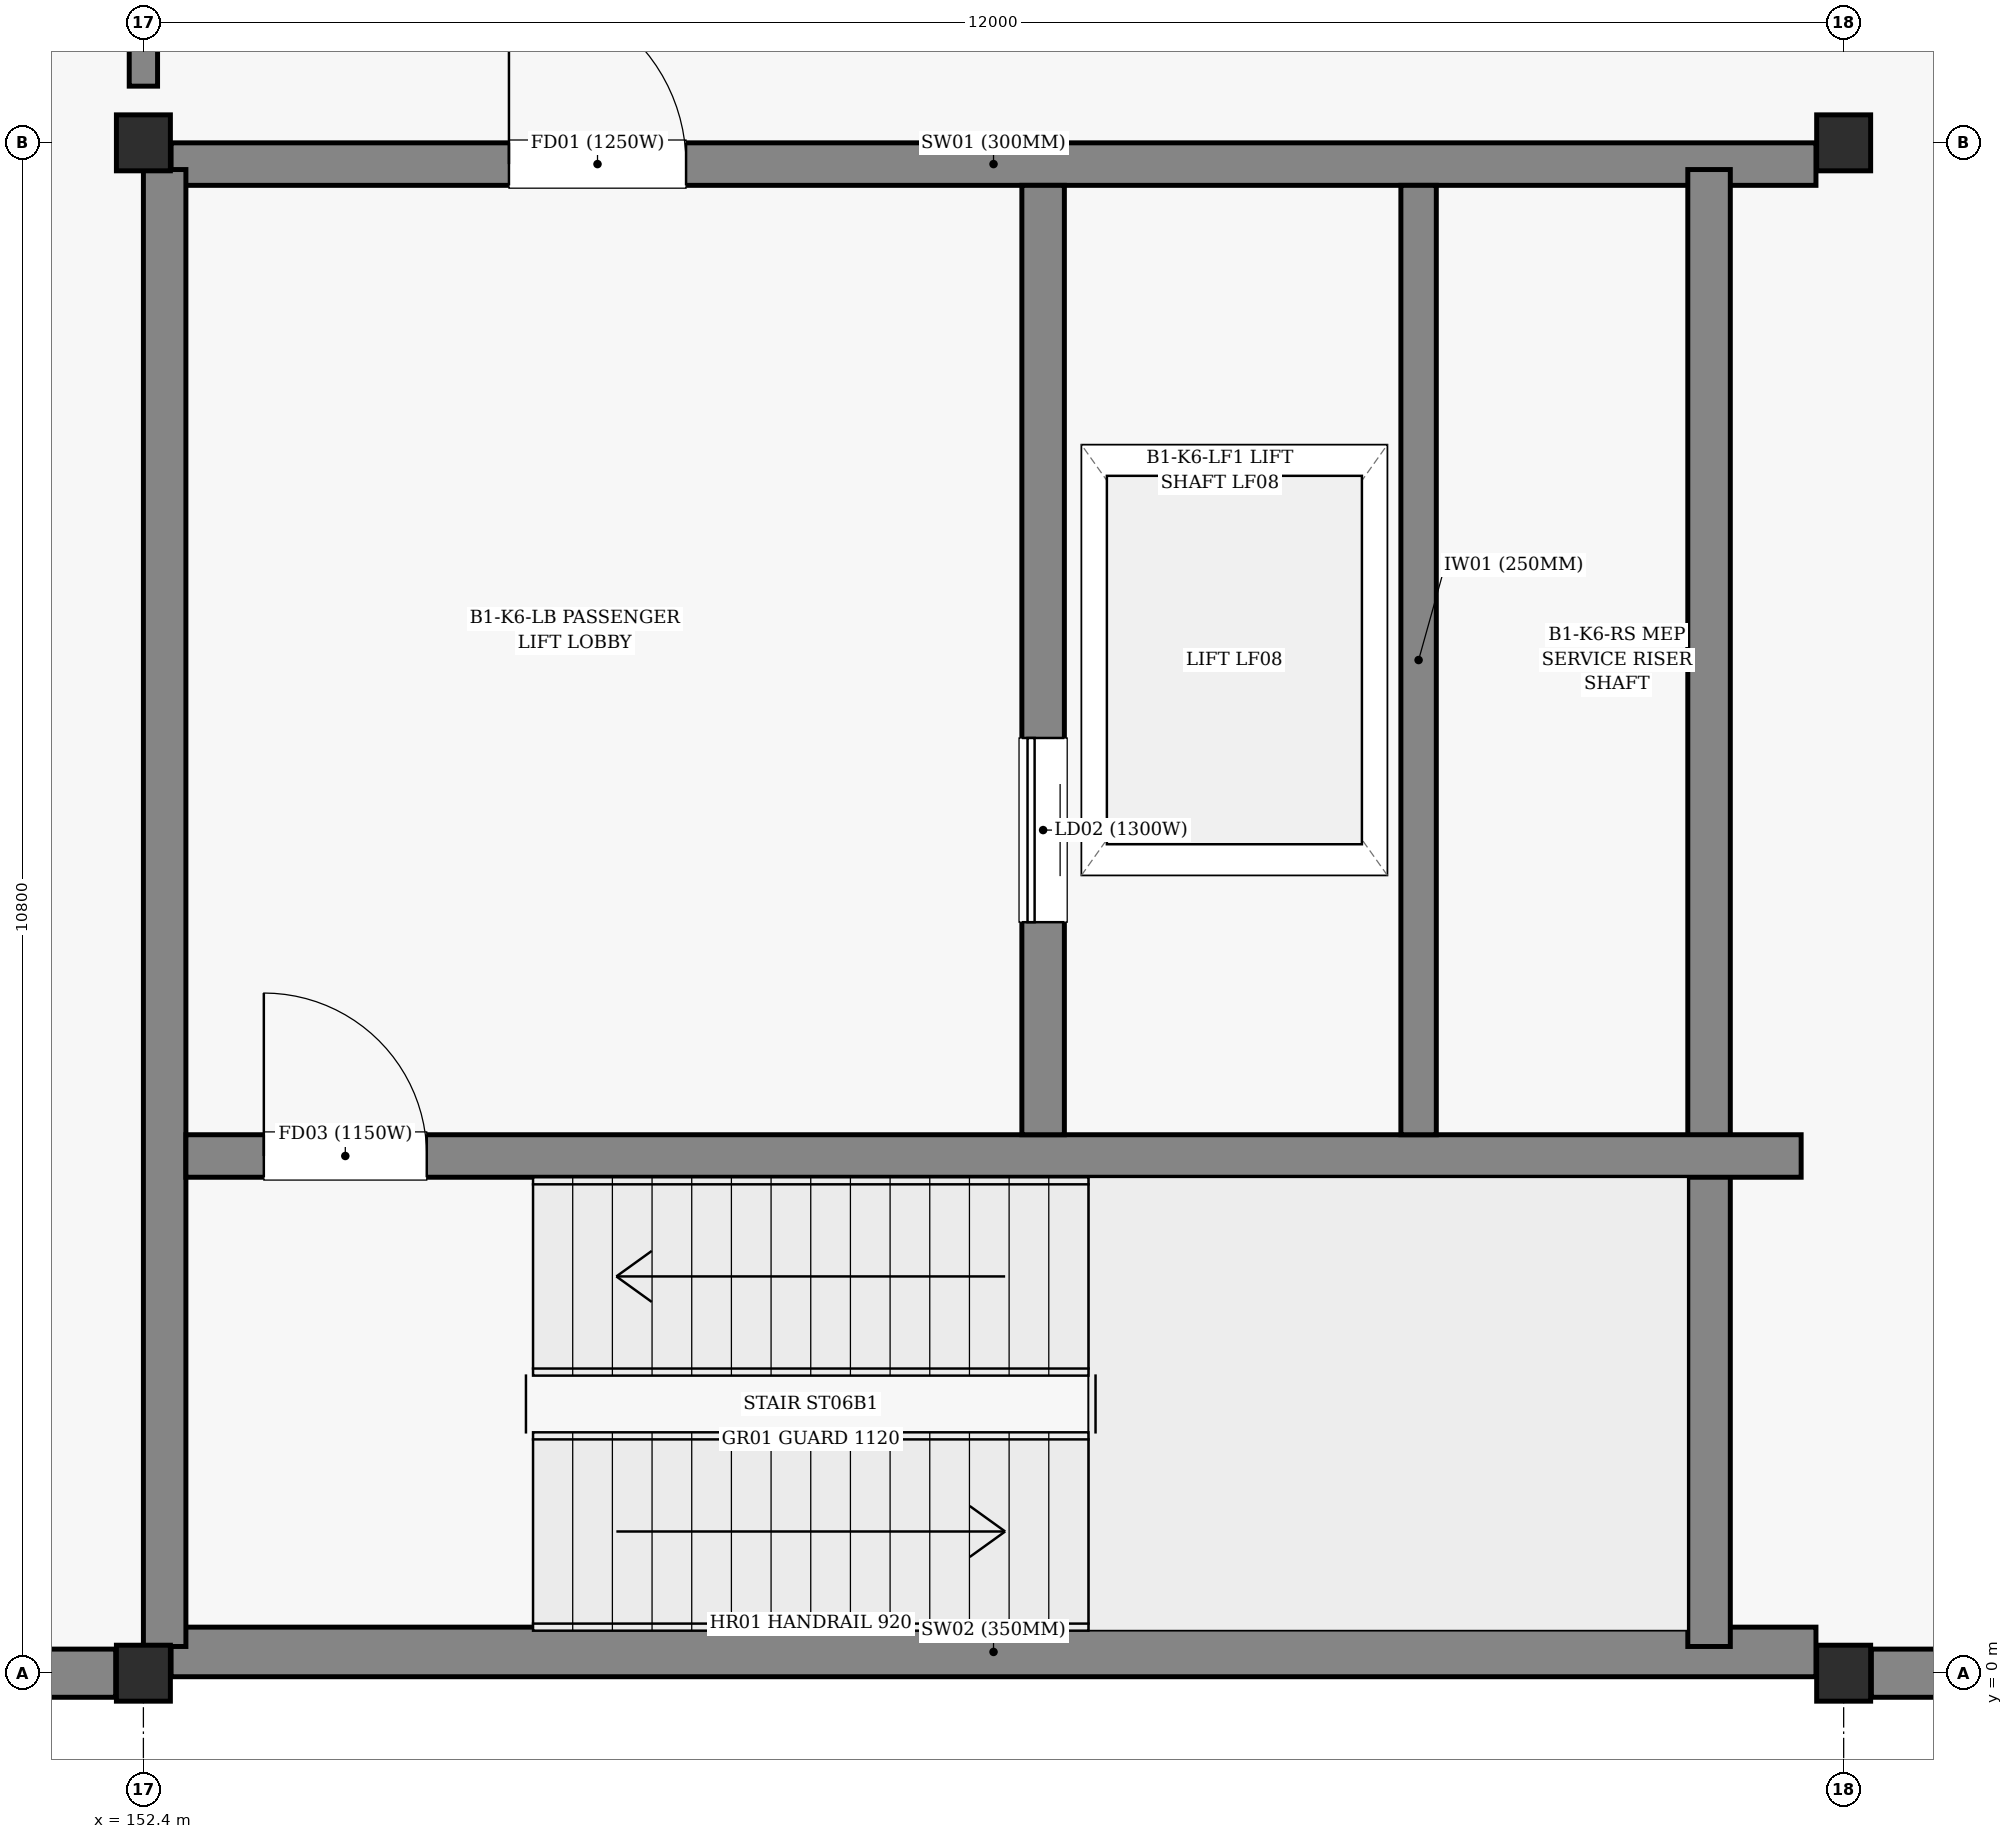
"""IFC4 building model, lengths in metres.
Left out: names, types, materials, properties, quantities, classifications, styles, units other than length and angle.
Written with IfcOpenShell. Run it as: python <this file> out.ifc"""

import sys

from ifc_helpers import new_model, si_unit, direction, frame, frame_2d, origin, origin_2d, place, context, subcontext, project, spatial, rectangle, i_section, extrude, element, fill, save


model = new_model("IFC4")
c1 = context("Model", 3, precision=1e-05, world=origin(), true_north=direction((0.0, 1.0)))
c2 = subcontext(c1, "Body", "Model", "MODEL_VIEW")
j1 = project(units=[si_unit("LENGTHUNIT", "METRE"), si_unit("PLANEANGLEUNIT", "RADIAN")], contexts=[c1])
p1 = place(None, origin())
s1 = spatial("IfcSite", under=j1, at=p1, CompositionType="ELEMENT")
p2 = place(p1, origin())
s2 = spatial("IfcBuilding", under=s1, at=p2, CompositionType="ELEMENT")
p3 = place(p2, frame((0.0, 0.0, -5.4)))
s3 = spatial("IfcBuildingStorey", under=s2, at=p3, CompositionType="ELEMENT", Elevation=-5.4)
for number, where, z_axis, x_axis in (
    (1, (152.4, 0.0, 0.0), (0.0, 0.0, 1.0), (1.0, 0.0, 0.0)),
    (2, (152.4, 10.8, 0.0), (0.0, 0.0, 1.0), (1.0, 0.0, 0.0)),
    (3, (164.4, 0.0, 0.0), (0.0, 0.0, 1.0), (1.0, 0.0, 0.0)),
    (4, (164.4, 10.8, 0.0), (0.0, 0.0, 1.0), (1.0, 0.0, 0.0)),
):
    element("IfcColumn", number, at=place(p3, frame(where, z_axis=z_axis, x_axis=x_axis)), inside=s3, PredefinedType="COLUMN", context=c2, shape_type="SweptSolid", body=[
        extrude(i_section(OverallWidth=0.395, OverallDepth=0.381, WebThickness=0.018, FlangeThickness=0.03, FilletRadius=0.015, at=origin_2d()), origin(), (0.0, 0.0, 1.0), 5.4),
    ])
for number, where, z_axis, x_axis in (
    (5, (140.595, 0.0, 0.0), (0.0, 0.0, 1.0), (1.0, 0.0, 0.0)),
    (6, (164.595, 0.0, 0.0), (0.0, 0.0, 1.0), (1.0, 0.0, 0.0)),
):
    element("IfcWall", number, at=place(p3, frame(where, z_axis=z_axis, x_axis=x_axis)), inside=s3, PredefinedType="USERDEFINED", context=c2, shape_type="SweptSolid", body=[
        extrude(rectangle(XDim=11.609, YDim=0.34, at=frame_2d((5.805, 0.0))), origin(), (0.0, 0.0, 1.0), 4.06),
    ])
p4 = place(p3, frame((152.595, 0.15, 0.0), z_axis=(0.0, 0.0, 1.0), x_axis=(1.0, 0.0, 0.0)))
e7 = element("IfcWall", 7, at=p4, inside=s3, PredefinedType="SHEAR", context=c2, shape_type="SweptSolid", body=[
    extrude(rectangle(XDim=11.609, YDim=0.35, at=frame_2d((5.805, 0.0))), origin(), (0.0, 0.0, 1.0), 5.12),
])
p5 = place(p3, frame((152.595, 10.65, 0.0), z_axis=(0.0, 0.0, 1.0), x_axis=(1.0, 0.0, 0.0)))
e8 = element("IfcWall", 8, at=p5, inside=s3, PredefinedType="SHEAR", context=c2, shape_type="SweptSolid", body=[
    extrude(rectangle(XDim=11.609, YDim=0.3, at=frame_2d((5.805, 0.0))), origin(), (0.0, 0.0, 1.0), 5.12),
])
p6 = place(p5, frame((2.385, 0.0, 0.0)))
e9 = element("IfcOpeningElement", 9, at=p6, cuts=e8, PredefinedType="OPENING", context=c2, shape_type="SweptSolid", body=[
    extrude(rectangle(XDim=1.25, YDim=2.15, at=frame_2d((0.625, 1.075))), frame((0.0, 0.16, 0.0), z_axis=(0.0, -1.0, 0.0), x_axis=(1.0, 0.0, 0.0)), (0.0, 0.0, 1.0), 0.32),
])
for number, where, z_axis, x_axis in (
    (10, (152.55, 0.188, 0.0), (0.0, 0.0, 1.0), (0.0, 1.0, 0.0)),
    (11, (163.45, 0.188, 0.0), (0.0, 0.0, 1.0), (0.0, 1.0, 0.0)),
):
    element("IfcWall", number, at=place(p3, frame(where, z_axis=z_axis, x_axis=x_axis)), inside=s3, PredefinedType="SHEAR", context=c2, shape_type="SweptSolid", body=[
        extrude(rectangle(XDim=10.423, YDim=0.3, at=frame_2d((5.211, 0.0))), origin(), (0.0, 0.0, 1.0), 5.12),
    ])
p7 = place(p3, frame((152.7, 3.65, 0.0), z_axis=(0.0, 0.0, 1.0), x_axis=(1.0, 0.0, 0.0)))
e12 = element("IfcWall", 12, at=p7, inside=s3, PredefinedType="SHEAR", context=c2, shape_type="SweptSolid", body=[
    extrude(rectangle(XDim=11.4, YDim=0.3, at=frame_2d((5.7, 0.0))), origin(), (0.0, 0.0, 1.0), 5.12),
])
p8 = place(p7, frame((0.55, 0.0, 0.0)))
e13 = element("IfcOpeningElement", 13, at=p8, cuts=e12, PredefinedType="OPENING", context=c2, shape_type="SweptSolid", body=[
    extrude(rectangle(XDim=1.15, YDim=2.15, at=frame_2d((0.575, 1.075))), frame((0.0, 0.16, 0.0), z_axis=(0.0, -1.0, 0.0), x_axis=(1.0, 0.0, 0.0)), (0.0, 0.0, 1.0), 0.32),
])
p9 = place(p3, frame((158.75, 3.8, 0.0), z_axis=(0.0, 0.0, 1.0), x_axis=(0.0, 1.0, 0.0)))
e14 = element("IfcWall", 14, at=p9, inside=s3, PredefinedType="SHEAR", context=c2, shape_type="SweptSolid", body=[
    extrude(rectangle(XDim=6.7, YDim=0.3, at=frame_2d((3.35, 0.0))), origin(), (0.0, 0.0, 1.0), 5.12),
])
p10 = place(p9, frame((1.5, 0.0, 0.0)))
e15 = element("IfcOpeningElement", 15, at=p10, cuts=e14, PredefinedType="OPENING", context=c2, shape_type="SweptSolid", body=[
    extrude(rectangle(XDim=1.3, YDim=2.3, at=frame_2d((0.65, 1.15))), frame((0.0, 0.16, 0.0), z_axis=(0.0, -1.0, 0.0), x_axis=(1.0, 0.0, 0.0)), (0.0, 0.0, 1.0), 0.32),
])
p11 = place(p3, frame((161.4, 3.8, 0.0), z_axis=(0.0, 0.0, 1.0), x_axis=(0.0, 1.0, 0.0)))
e16 = element("IfcWall", 16, at=p11, inside=s3, PredefinedType="PARTITIONING", context=c2, shape_type="SweptSolid", body=[
    extrude(rectangle(XDim=6.7, YDim=0.25, at=frame_2d((3.35, 0.0))), origin(), (0.0, 0.0, 1.0), 4.025),
])
p12 = place(p3, frame((152.4, 11.2, 0.0), z_axis=(0.0, 0.0, 1.0), x_axis=(0.0, 1.0, 0.0)))
e17 = element("IfcWall", 17, at=p12, inside=s3, PredefinedType="PARTITIONING", context=c2, shape_type="SweptSolid", body=[
    extrude(rectangle(XDim=26.8, YDim=0.2, at=frame_2d((13.4, 0.0))), origin(), (0.0, 0.0, 1.0), 4.025),
])
p13 = place(p12, frame((4.5, 0.0, 0.0)))
e18 = element("IfcOpeningElement", 18, at=p13, cuts=e17, PredefinedType="OPENING", context=c2, shape_type="SweptSolid", body=[
    extrude(rectangle(XDim=1.6, YDim=2.25, at=frame_2d((0.8, 1.125))), frame((0.0, 0.11, 0.0), z_axis=(0.0, -1.0, 0.0), x_axis=(1.0, 0.0, 0.0)), (0.0, 0.0, 1.0), 0.22),
])
p14 = place(p6, origin())
e19 = element("IfcDoor", 19, at=p14, inside=s3, OperationType="SINGLE_SWING_LEFT", PredefinedType="DOOR", context=c2, shape_type="SweptSolid", body=[
    extrude(rectangle(XDim=1.25, YDim=2.15, at=frame_2d((0.625, 1.075))), frame((0.0, 0.025, 0.0), z_axis=(0.0, -1.0, 0.0), x_axis=(1.0, 0.0, 0.0)), (0.0, 0.0, 1.0), 0.05),
])
fill(e9, e19)
p15 = place(p8, origin())
e20 = element("IfcDoor", 20, at=p15, inside=s3, OperationType="SINGLE_SWING_LEFT", PredefinedType="DOOR", context=c2, shape_type="SweptSolid", body=[
    extrude(rectangle(XDim=1.15, YDim=2.15, at=frame_2d((0.575, 1.075))), frame((0.0, 0.025, 0.0), z_axis=(0.0, -1.0, 0.0), x_axis=(1.0, 0.0, 0.0)), (0.0, 0.0, 1.0), 0.05),
])
fill(e13, e20)
p16 = place(p10, origin())
e21 = element("IfcDoor", 21, at=p16, inside=s3, OperationType="SLIDING_TO_LEFT", PredefinedType="DOOR", context=c2, shape_type="SweptSolid", body=[
    extrude(rectangle(XDim=1.3, YDim=2.3, at=frame_2d((0.65, 1.15))), frame((0.0, 0.025, 0.0), z_axis=(0.0, -1.0, 0.0), x_axis=(1.0, 0.0, 0.0)), (0.0, 0.0, 1.0), 0.05),
])
fill(e15, e21)
save(model, sys.argv[1])
